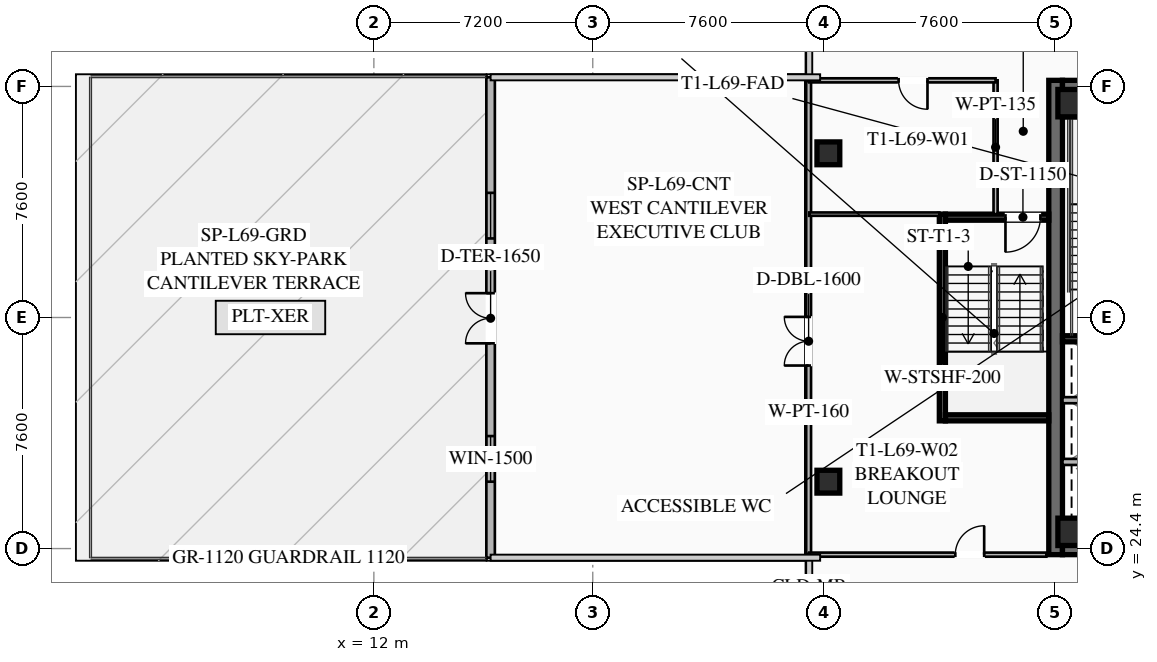
"""IFC4 building model, lengths in metres.
Left out: names, types, materials, properties, quantities, classifications, styles, units other than length and angle.
Written with IfcOpenShell. Run it as: python <this file> out.ifc"""

import sys

from ifc_helpers import new_model, si_unit, direction, frame, frame_2d, origin, origin_2d, place, context, subcontext, project, spatial, rectangle, hollow_rectangle, extrude, element, fill, save


model = new_model("IFC4")
c1 = context("Model", 3, precision=1e-05, world=origin(), true_north=direction((0.0, 1.0)))
c2 = subcontext(c1, "Body", "Model", "MODEL_VIEW")
j1 = project(units=[si_unit("LENGTHUNIT", "METRE"), si_unit("PLANEANGLEUNIT", "RADIAN")], contexts=[c1])
p1 = place(None, origin())
s1 = spatial("IfcSite", under=j1, at=p1, CompositionType="ELEMENT")
p2 = place(p1, origin())
s2 = spatial("IfcBuilding", under=s1, at=p2, CompositionType="ELEMENT")
p3 = place(p2, frame((0.0, 0.0, 255.4)))
s3 = spatial("IfcBuildingStorey", under=s2, at=p3, CompositionType="ELEMENT", Elevation=255.4)
p4 = place(p3, frame((34.425, 24.2, 0.0), z_axis=(0.0, 0.0, 1.0), x_axis=(0.0, 1.0, 0.0)))
e1 = element("IfcWall", 1, at=p4, inside=s3, PredefinedType="SHEAR", context=c2, shape_type="SweptSolid", body=[
    extrude(rectangle(XDim=15.6, YDim=0.45, at=frame_2d((7.8, 0.0))), origin(), (0.0, 0.0, 1.0), 4.0),
])
p5 = place(p3, frame((49.35, 24.425, 0.0), z_axis=(0.0, 0.0, 1.0), x_axis=(-1.0, 0.0, 0.0)))
e2 = element("IfcWall", 2, at=p5, inside=s3, PredefinedType="SHEAR", context=c2, shape_type="SweptSolid", body=[
    extrude(rectangle(XDim=14.7, YDim=0.45, at=frame_2d((7.35, 0.0))), origin(), (0.0, 0.0, 1.0), 4.0),
])
p6 = place(p5, frame((9.05, 0.0, 0.0)))
e3 = element("IfcOpeningElement", 3, at=p6, cuts=e2, PredefinedType="OPENING", context=c2, shape_type="SweptSolid", body=[
    extrude(rectangle(XDim=1.25, YDim=2.25, at=frame_2d((0.625, 1.125))), frame((0.0, 0.235, 0.0), z_axis=(0.0, -1.0, 0.0), x_axis=(1.0, 0.0, 0.0)), (0.0, 0.0, 1.0), 0.47),
])
p7 = place(p5, frame((4.0, 0.0, 0.0)))
e4 = element("IfcOpeningElement", 4, at=p7, cuts=e2, PredefinedType="OPENING", context=c2, shape_type="SweptSolid", body=[
    extrude(rectangle(XDim=1.25, YDim=2.25, at=frame_2d((0.625, 1.125))), frame((0.0, 0.235, 0.0), z_axis=(0.0, -1.0, 0.0), x_axis=(1.0, 0.0, 0.0)), (0.0, 0.0, 1.0), 0.47),
])
p8 = place(p3, frame((34.65, 39.575, 0.0), z_axis=(0.0, 0.0, 1.0), x_axis=(1.0, 0.0, 0.0)))
e5 = element("IfcWall", 5, at=p8, inside=s3, PredefinedType="SHEAR", context=c2, shape_type="SweptSolid", body=[
    extrude(rectangle(XDim=14.7, YDim=0.45, at=frame_2d((7.35, 0.0))), origin(), (0.0, 0.0, 1.0), 4.0),
])
p9 = place(p8, frame((4.4, 0.0, 0.0)))
e6 = element("IfcOpeningElement", 6, at=p9, cuts=e5, PredefinedType="OPENING", context=c2, shape_type="SweptSolid", body=[
    extrude(rectangle(XDim=1.25, YDim=2.25, at=frame_2d((0.625, 1.125))), frame((0.0, 0.235, 0.0), z_axis=(0.0, -1.0, 0.0), x_axis=(1.0, 0.0, 0.0)), (0.0, 0.0, 1.0), 0.47),
])
p10 = place(p8, frame((9.45, 0.0, 0.0)))
e7 = element("IfcOpeningElement", 7, at=p10, cuts=e5, PredefinedType="OPENING", context=c2, shape_type="SweptSolid", body=[
    extrude(rectangle(XDim=1.25, YDim=2.25, at=frame_2d((0.625, 1.125))), frame((0.0, 0.235, 0.0), z_axis=(0.0, -1.0, 0.0), x_axis=(1.0, 0.0, 0.0)), (0.0, 0.0, 1.0), 0.47),
])
for number, where, z_axis, x_axis in (
    (8, (34.95, 24.95, 0.0), (0.0, 0.0, 1.0), (1.0, 0.0, 0.0)),
    (9, (34.95, 39.05, 0.0), (0.0, 0.0, 1.0), (1.0, 0.0, 0.0)),
):
    element("IfcColumn", number, at=place(p3, frame(where, z_axis=z_axis, x_axis=x_axis)), inside=s3, PredefinedType="COLUMN", context=c2, shape_type="SweptSolid", body=[
        extrude(hollow_rectangle(XDim=0.9, YDim=0.9, WallThickness=0.04, at=origin_2d()), origin(), (0.0, 0.0, 1.0), 3.78),
    ])
for number, where, z_axis, x_axis in (
    (10, (26.95, 37.4, 0.0), (0.0, 0.0, 1.0), (1.0, 0.0, 0.0)),
    (11, (26.95, 26.6, 0.0), (0.0, 0.0, 1.0), (1.0, 0.0, 0.0)),
):
    element("IfcColumn", number, at=place(p3, frame(where, z_axis=z_axis, x_axis=x_axis)), inside=s3, PredefinedType="COLUMN", context=c2, shape_type="SweptSolid", body=[
        extrude(hollow_rectangle(XDim=0.75, YDim=0.75, WallThickness=0.032, at=origin_2d()), origin(), (0.0, 0.0, 1.0), 3.78),
    ])
p11 = place(p3, frame((15.84, 24.1, 0.0), z_axis=(0.0, 0.0, 1.0), x_axis=(0.0, 1.0, 0.0)))
e12 = element("IfcWall", 12, at=p11, inside=s3, PredefinedType="SOLIDWALL", context=c2, shape_type="SweptSolid", body=[
    extrude(rectangle(XDim=15.8, YDim=0.28, at=frame_2d((7.9, 0.0))), origin(), (0.0, 0.0, 1.0), 3.78),
])
p12 = place(p11, frame((7.05, 0.0, 0.0)))
e13 = element("IfcOpeningElement", 13, at=p12, cuts=e12, PredefinedType="OPENING", context=c2, shape_type="SweptSolid", body=[
    extrude(rectangle(XDim=1.65, YDim=2.2, at=frame_2d((0.825, 1.1))), frame((0.0, 0.15, 0.0), z_axis=(0.0, -1.0, 0.0), x_axis=(1.0, 0.0, 0.0)), (0.0, 0.0, 1.0), 0.3),
])
p13 = place(p11, frame((2.5, 0.0, 0.9)))
e14 = element("IfcOpeningElement", 14, at=p13, cuts=e12, PredefinedType="OPENING", context=c2, shape_type="SweptSolid", body=[
    extrude(rectangle(XDim=1.5, YDim=1.8, at=frame_2d((0.75, 0.9))), frame((0.0, 0.15, 0.0), z_axis=(0.0, -1.0, 0.0), x_axis=(1.0, 0.0, 0.0)), (0.0, 0.0, 1.0), 0.3),
])
p14 = place(p11, frame((10.5, 0.0, 0.9)))
e15 = element("IfcOpeningElement", 15, at=p14, cuts=e12, PredefinedType="OPENING", context=c2, shape_type="SweptSolid", body=[
    extrude(rectangle(XDim=1.5, YDim=1.8, at=frame_2d((0.75, 0.9))), frame((0.0, 0.15, 0.0), z_axis=(0.0, -1.0, 0.0), x_axis=(1.0, 0.0, 0.0)), (0.0, 0.0, 1.0), 0.3),
])
p15 = place(p3, frame((26.3, 24.22, 0.0), z_axis=(0.0, 0.0, 1.0), x_axis=(0.0, 1.0, 0.0)))
e16 = element("IfcWall", 16, at=p15, inside=s3, PredefinedType="PARTITIONING", context=c2, shape_type="SweptSolid", body=[
    extrude(rectangle(XDim=15.56, YDim=0.16, at=frame_2d((7.78, 0.0))), origin(), (0.0, 0.0, 1.0), 2.971),
])
p16 = place(p15, frame((6.2, 0.0, 0.0)))
e17 = element("IfcOpeningElement", 17, at=p16, cuts=e16, PredefinedType="OPENING", context=c2, shape_type="SweptSolid", body=[
    extrude(rectangle(XDim=1.6, YDim=2.25, at=frame_2d((0.8, 1.125))), frame((0.0, 0.09, 0.0), z_axis=(0.0, -1.0, 0.0), x_axis=(1.0, 0.0, 0.0)), (0.0, 0.0, 1.0), 0.18),
])
for number, where, z_axis, x_axis in (
    (18, (34.65, 31.3, 0.0), (0.0, 0.0, 1.0), (1.0, 0.0, 0.0)),
    (19, (34.65, 38.7, 0.0), (0.0, 0.0, 1.0), (1.0, 0.0, 0.0)),
):
    element("IfcWall", number, at=place(p3, frame(where, z_axis=z_axis, x_axis=x_axis)), inside=s3, PredefinedType="SHEAR", context=c2, shape_type="SweptSolid", body=[
        extrude(rectangle(XDim=3.65, YDim=0.2, at=frame_2d((1.825, 0.0))), origin(), (0.0, 0.0, 1.0), 3.78),
    ])
for number, where, z_axis, x_axis in (
    (20, (34.65, 27.25, 0.0), (0.0, 0.0, 1.0), (1.0, 0.0, 0.0)),
    (21, (34.65, 29.28, 0.0), (0.0, 0.0, 1.0), (1.0, 0.0, 0.0)),
):
    element("IfcWall", number, at=place(p3, frame(where, z_axis=z_axis, x_axis=x_axis)), inside=s3, PredefinedType="SOLIDWALL", context=c2, shape_type="SweptSolid", body=[
        extrude(rectangle(XDim=3.3, YDim=0.2, at=frame_2d((1.65, 0.0))), origin(), (0.0, 0.0, 1.0), 3.78),
    ])
p17 = place(p3, frame((30.7, 28.6, 0.0), z_axis=(0.0, 0.0, 1.0), x_axis=(0.0, 1.0, 0.0)))
e22 = element("IfcWall", 22, at=p17, inside=s3, PredefinedType="SHEAR", context=c2, shape_type="SweptSolid", body=[
    extrude(rectangle(XDim=6.8, YDim=0.2, at=frame_2d((3.4, 0.0))), origin(), (0.0, 0.0, 1.0), 3.78),
])
p18 = place(p3, frame((34.2, 35.3, 0.0), z_axis=(0.0, 0.0, 1.0), x_axis=(-1.0, 0.0, 0.0)))
e23 = element("IfcWall", 23, at=p18, inside=s3, PredefinedType="SHEAR", context=c2, shape_type="SweptSolid", body=[
    extrude(rectangle(XDim=3.4, YDim=0.2, at=frame_2d((1.7, 0.0))), origin(), (0.0, 0.0, 1.0), 3.78),
])
p19 = place(p18, frame((0.275, 0.0, 0.0)))
e24 = element("IfcOpeningElement", 24, at=p19, cuts=e23, PredefinedType="OPENING", context=c2, shape_type="SweptSolid", body=[
    extrude(rectangle(XDim=1.15, YDim=2.2, at=frame_2d((0.575, 1.1))), frame((0.0, 0.11, 0.0), z_axis=(0.0, -1.0, 0.0), x_axis=(1.0, 0.0, 0.0)), (0.0, 0.0, 1.0), 0.22),
])
p20 = place(p3, frame((30.8, 28.7, 0.0), z_axis=(0.0, 0.0, 1.0), x_axis=(1.0, 0.0, 0.0)))
e25 = element("IfcWall", 25, at=p20, inside=s3, PredefinedType="SHEAR", context=c2, shape_type="SweptSolid", body=[
    extrude(rectangle(XDim=3.4, YDim=0.2, at=frame_2d((1.7, 0.0))), origin(), (0.0, 0.0, 1.0), 3.78),
])
p21 = place(p3, frame((32.45, 35.4, 0.0), z_axis=(0.0, 0.0, 1.0), x_axis=(0.0, 1.0, 0.0)))
e26 = element("IfcWall", 26, at=p21, inside=s3, PredefinedType="PARTITIONING", context=c2, shape_type="SweptSolid", body=[
    extrude(rectangle(XDim=4.4, YDim=0.135, at=frame_2d((2.2, 0.0))), origin(), (0.0, 0.0, 1.0), 2.971),
])
p22 = place(p3, frame((32.45, 39.8, 0.0), z_axis=(0.0, 0.0, 1.0), x_axis=(-1.0, 0.0, 0.0)))
e27 = element("IfcWall", 27, at=p22, inside=s3, PredefinedType="PARTITIONING", context=c2, shape_type="SweptSolid", body=[
    extrude(rectangle(XDim=6.13, YDim=0.135, at=frame_2d((3.065, 0.0))), origin(), (0.0, 0.0, 1.0), 2.971),
])
p23 = place(p22, frame((2.24, 0.0, 0.0)))
e28 = element("IfcOpeningElement", 28, at=p23, cuts=e27, PredefinedType="OPENING", context=c2, shape_type="SweptSolid", body=[
    extrude(rectangle(XDim=0.95, YDim=2.05, at=frame_2d((0.475, 1.025))), frame((0.0, 0.077, 0.0), z_axis=(0.0, -1.0, 0.0), x_axis=(1.0, 0.0, 0.0)), (0.0, 0.0, 1.0), 0.155),
])
p24 = place(p3, frame((26.32, 24.2, 0.0), z_axis=(0.0, 0.0, 1.0), x_axis=(1.0, 0.0, 0.0)))
e29 = element("IfcWall", 29, at=p24, inside=s3, PredefinedType="PARTITIONING", context=c2, shape_type="SweptSolid", body=[
    extrude(rectangle(XDim=7.8, YDim=0.135, at=frame_2d((3.9, 0.0))), origin(), (0.0, 0.0, 1.0), 2.971),
])
p25 = place(p24, frame((4.805, 0.0, 0.0)))
e30 = element("IfcOpeningElement", 30, at=p25, cuts=e29, PredefinedType="OPENING", context=c2, shape_type="SweptSolid", body=[
    extrude(rectangle(XDim=0.95, YDim=2.05, at=frame_2d((0.475, 1.025))), frame((0.0, 0.077, 0.0), z_axis=(0.0, -1.0, 0.0), x_axis=(1.0, 0.0, 0.0)), (0.0, 0.0, 1.0), 0.155),
])
p26 = place(p3, frame((30.6, 35.4, 0.0), z_axis=(0.0, 0.0, 1.0), x_axis=(-1.0, 0.0, 0.0)))
e31 = element("IfcWall", 31, at=p26, inside=s3, PredefinedType="PARTITIONING", context=c2, shape_type="SweptSolid", body=[
    extrude(rectangle(XDim=4.28, YDim=0.11, at=frame_2d((2.14, 0.0))), origin(), (0.0, 0.0, 1.0), 2.971),
])
p27 = place(p12, origin())
e32 = element("IfcDoor", 32, at=p27, inside=s3, OperationType="DOUBLE_DOOR_SINGLE_SWING", PredefinedType="DOOR", context=c2, shape_type="SweptSolid", body=[
    extrude(rectangle(XDim=1.65, YDim=2.2, at=frame_2d((0.825, 1.1))), frame((0.0, 0.025, 0.0), z_axis=(0.0, -1.0, 0.0), x_axis=(1.0, 0.0, 0.0)), (0.0, 0.0, 1.0), 0.05),
])
fill(e13, e32)
p28 = place(p13, origin())
e33 = element("IfcWindow", 33, at=p28, inside=s3, PartitioningType="SINGLE_PANEL", PredefinedType="WINDOW", context=c2, shape_type="SweptSolid", body=[
    extrude(rectangle(XDim=1.5, YDim=1.8, at=frame_2d((0.75, 0.9))), frame((0.0, 0.03, 0.0), z_axis=(0.0, -1.0, 0.0), x_axis=(1.0, 0.0, 0.0)), (0.0, 0.0, 1.0), 0.06),
])
fill(e14, e33)
p29 = place(p14, origin())
e34 = element("IfcWindow", 34, at=p29, inside=s3, PartitioningType="SINGLE_PANEL", PredefinedType="WINDOW", context=c2, shape_type="SweptSolid", body=[
    extrude(rectangle(XDim=1.5, YDim=1.8, at=frame_2d((0.75, 0.9))), frame((0.0, 0.03, 0.0), z_axis=(0.0, -1.0, 0.0), x_axis=(1.0, 0.0, 0.0)), (0.0, 0.0, 1.0), 0.06),
])
fill(e15, e34)
p30 = place(p16, origin())
e35 = element("IfcDoor", 35, at=p30, inside=s3, OperationType="DOUBLE_DOOR_SINGLE_SWING", PredefinedType="DOOR", context=c2, shape_type="SweptSolid", body=[
    extrude(rectangle(XDim=1.6, YDim=2.25, at=frame_2d((0.8, 1.125))), frame((0.0, 0.025, 0.0), z_axis=(0.0, -1.0, 0.0), x_axis=(1.0, 0.0, 0.0)), (0.0, 0.0, 1.0), 0.05),
])
fill(e17, e35)
p31 = place(p19, origin())
e36 = element("IfcDoor", 36, at=p31, inside=s3, OperationType="SINGLE_SWING_RIGHT", PredefinedType="DOOR", context=c2, shape_type="SweptSolid", body=[
    extrude(rectangle(XDim=1.15, YDim=2.2, at=frame_2d((0.575, 1.1))), frame((0.0, 0.025, 0.0), z_axis=(0.0, -1.0, 0.0), x_axis=(1.0, 0.0, 0.0)), (0.0, 0.0, 1.0), 0.05),
])
fill(e24, e36)
p32 = place(p23, origin())
e37 = element("IfcDoor", 37, at=p32, inside=s3, OperationType="SINGLE_SWING_LEFT", PredefinedType="DOOR", context=c2, shape_type="SweptSolid", body=[
    extrude(rectangle(XDim=0.95, YDim=2.05, at=frame_2d((0.475, 1.025))), frame((0.0, 0.025, 0.0), z_axis=(0.0, -1.0, 0.0), x_axis=(1.0, 0.0, 0.0)), (0.0, 0.0, 1.0), 0.05),
])
fill(e28, e37)
p33 = place(p25, origin())
e38 = element("IfcDoor", 38, at=p33, inside=s3, OperationType="SINGLE_SWING_RIGHT", PredefinedType="DOOR", context=c2, shape_type="SweptSolid", body=[
    extrude(rectangle(XDim=0.95, YDim=2.05, at=frame_2d((0.475, 1.025))), frame((0.0, 0.025, 0.0), z_axis=(0.0, -1.0, 0.0), x_axis=(1.0, 0.0, 0.0)), (0.0, 0.0, 1.0), 0.05),
])
fill(e30, e38)
save(model, sys.argv[1])
